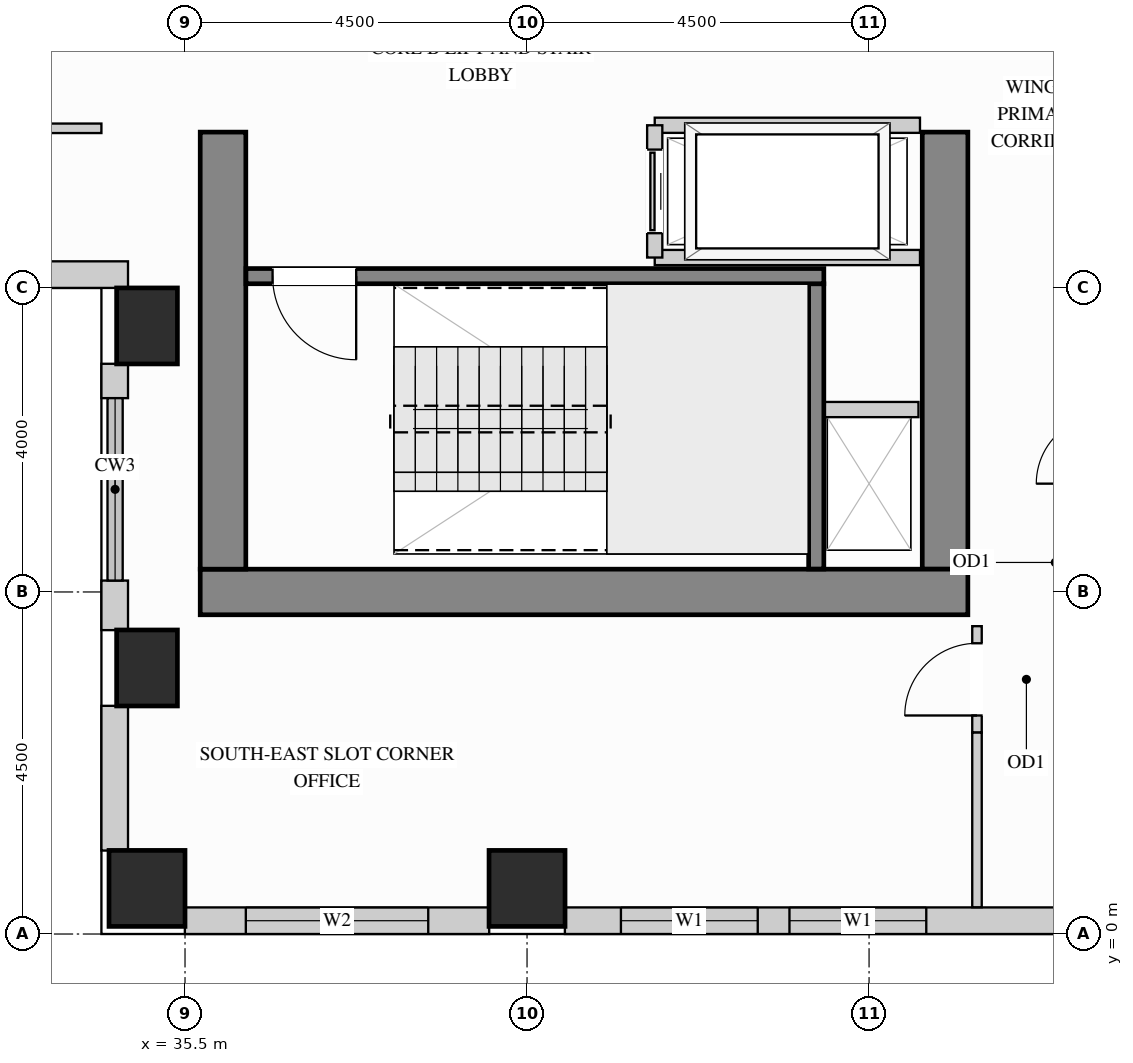
"""IFC4 building model, lengths in metres.
Left out: names, types, materials, properties, quantities, classifications, styles, units other than length and angle.
Written with IfcOpenShell. Run it as: python <this file> out.ifc"""

import sys

from ifc_helpers import new_model, si_unit, direction, frame, frame_2d, origin, origin_2d, place, context, subcontext, project, spatial, rectangle, extrude, source, transform, mapped, element, fill, save


model = new_model("IFC4")
c1 = context("Model", 3, precision=1e-05, world=origin(), true_north=direction((0.0, 1.0)))
c2 = subcontext(c1, "Body", "Model", "MODEL_VIEW")
j1 = project(units=[si_unit("LENGTHUNIT", "METRE"), si_unit("PLANEANGLEUNIT", "RADIAN")], contexts=[c1])
p1 = place(None, origin())
s1 = spatial("IfcSite", under=j1, at=p1, CompositionType="ELEMENT")
p2 = place(p1, origin())
s2 = spatial("IfcBuilding", under=s1, at=p2, CompositionType="ELEMENT")
p3 = place(p2, frame((0.0, 0.0, 161.1)))
s3 = spatial("IfcBuildingStorey", under=s2, at=p3, CompositionType="ELEMENT", Elevation=161.1)
m1 = source(origin(), c2, "Body", "SweptSolid", [
    extrude(rectangle(XDim=0.8, YDim=1.0, at=origin_2d()), origin(), (0.0, 0.0, 1.0), 3.4),
])
for number, where, z_axis, x_axis in (
    (1, (35.0, 3.5, 0.0), (0.0, 0.0, 1.0), (1.0, 0.0, 0.0)),
    (2, (35.0, 8.0, 0.0), (0.0, 0.0, 1.0), (1.0, 0.0, 0.0)),
):
    element("IfcColumn", number, at=place(p3, frame(where, z_axis=z_axis, x_axis=x_axis)), inside=s3, PredefinedType="COLUMN", context=c2, shape_type="MappedRepresentation", body=[
        mapped(m1, transform((0.0, 0.0, 0.0), x_axis=(1.0, 0.0, 0.0), y_axis=(0.0, 1.0, 0.0), z_axis=(0.0, 0.0, 1.0))),
    ])
m2 = source(origin(), c2, "Body", "SweptSolid", [
    extrude(rectangle(XDim=1.0, YDim=1.0, at=origin_2d()), origin(), (0.0, 0.0, 1.0), 3.4),
])
for number, where, z_axis, x_axis in (
    (3, (35.0, 0.6, 0.0), (0.0, 0.0, 1.0), (1.0, 0.0, 0.0)),
    (4, (40.0, 0.6, 0.0), (0.0, 0.0, 1.0), (1.0, 0.0, 0.0)),
):
    element("IfcColumn", number, at=place(p3, frame(where, z_axis=z_axis, x_axis=x_axis)), inside=s3, PredefinedType="COLUMN", context=c2, shape_type="MappedRepresentation", body=[
        mapped(m2, transform((0.0, 0.0, 0.0), x_axis=(1.0, 0.0, 0.0), y_axis=(0.0, 1.0, 0.0), z_axis=(0.0, 0.0, 1.0))),
    ])
m3 = source(origin(), c2, "Body", "SweptSolid", [
    extrude(rectangle(XDim=5.75, YDim=0.6, at=frame_2d((2.875, 0.0))), origin(), (0.0, 0.0, 1.0), 3.4),
])
p4 = place(p3, frame((45.5, 4.8, 0.0), z_axis=(0.0, 0.0, 1.0), x_axis=(0.0, 1.0, 0.0)))
e5 = element("IfcWall", 5, at=p4, inside=s3, PredefinedType="SHEAR", context=c2, shape_type="MappedRepresentation", body=[
    mapped(m3, transform((0.0, 0.0, 0.0), x_axis=(1.0, 0.0, 0.0), y_axis=(0.0, 1.0, 0.0), z_axis=(0.0, 0.0, 1.0))),
])
m4 = source(origin(), c2, "Body", "SweptSolid", [
    extrude(rectangle(XDim=10.1, YDim=0.6, at=frame_2d((5.05, 0.0))), origin(), (0.0, 0.0, 1.0), 3.4),
])
p5 = place(p3, frame((35.7, 4.5, 0.0), z_axis=(0.0, 0.0, 1.0), x_axis=(1.0, 0.0, 0.0)))
e6 = element("IfcWall", 6, at=p5, inside=s3, PredefinedType="SHEAR", context=c2, shape_type="MappedRepresentation", body=[
    mapped(m4, transform((0.0, 0.0, 0.0), x_axis=(1.0, 0.0, 0.0), y_axis=(0.0, 1.0, 0.0), z_axis=(0.0, 0.0, 1.0))),
])
p6 = place(p3, frame((36.0, 4.8, 0.0), z_axis=(0.0, 0.0, 1.0), x_axis=(0.0, 1.0, 0.0)))
e7 = element("IfcWall", 7, at=p6, inside=s3, PredefinedType="SHEAR", context=c2, shape_type="MappedRepresentation", body=[
    mapped(m3, transform((0.0, 0.0, 0.0), x_axis=(1.0, 0.0, 0.0), y_axis=(0.0, 1.0, 0.0), z_axis=(0.0, 0.0, 1.0))),
])
p7 = place(p3, frame((30.898, 8.675, 0.0), z_axis=(0.0, 0.0, 1.0), x_axis=(1.0, 0.0, 0.0)))
e8 = element("IfcWall", 8, at=p7, inside=s3, PredefinedType="SOLIDWALL", context=c2, shape_type="SweptSolid", body=[
    extrude(rectangle(XDim=3.852, YDim=0.35, at=frame_2d((1.926, 0.0))), origin(), (0.0, 0.0, 1.0), 3.385),
])
p8 = place(p7, frame((1.176, 0.0, 0.78)))
e9 = element("IfcOpeningElement", 9, at=p8, cuts=e8, PredefinedType="OPENING", context=c2, shape_type="SweptSolid", body=[
    extrude(rectangle(XDim=1.5, YDim=2.0, at=frame_2d((0.75, 1.0))), frame((0.0, 0.185, 0.0), z_axis=(0.0, -1.0, 0.0), x_axis=(1.0, 0.0, 0.0)), (0.0, 0.0, 1.0), 0.37),
])
m5 = source(origin(), c2, "Body", "SweptSolid", [
    extrude(rectangle(XDim=0.452, YDim=0.35, at=frame_2d((0.226, 0.0))), origin(), (0.0, 0.0, 1.0), 2.612),
])
p9 = place(p3, frame((34.575, 7.502, 0.0), z_axis=(0.0, 0.0, 1.0), x_axis=(0.0, -1.0, 0.0)))
e10 = element("IfcWall", 10, at=p9, inside=s3, PredefinedType="SOLIDWALL", context=c2, shape_type="MappedRepresentation", body=[
    mapped(m5, transform((0.0, 0.0, 0.0), x_axis=(1.0, 0.0, 0.0), y_axis=(0.0, 1.0, 0.0), z_axis=(0.0, 0.0, 1.0))),
])
m6 = source(origin(), c2, "Body", "SweptSolid", [
    extrude(rectangle(XDim=0.652, YDim=0.35, at=frame_2d((0.326, 0.0))), origin(), (0.0, 0.0, 1.0), 2.612),
])
p10 = place(p3, frame((34.575, 4.65, 0.0), z_axis=(0.0, 0.0, 1.0), x_axis=(0.0, -1.0, 0.0)))
e11 = element("IfcWall", 11, at=p10, inside=s3, PredefinedType="SOLIDWALL", context=c2, shape_type="MappedRepresentation", body=[
    mapped(m6, transform((0.0, 0.0, 0.0), x_axis=(1.0, 0.0, 0.0), y_axis=(0.0, 1.0, 0.0), z_axis=(0.0, 0.0, 1.0))),
])
m7 = source(origin(), c2, "Body", "SweptSolid", [
    extrude(rectangle(XDim=1.904, YDim=0.35, at=frame_2d((0.952, 0.0))), origin(), (0.0, 0.0, 1.0), 2.612),
])
p11 = place(p3, frame((34.575, 3.002, 0.0), z_axis=(0.0, 0.0, 1.0), x_axis=(0.0, -1.0, 0.0)))
e12 = element("IfcWall", 12, at=p11, inside=s3, PredefinedType="SOLIDWALL", context=c2, shape_type="MappedRepresentation", body=[
    mapped(m7, transform((0.0, 0.0, 0.0), x_axis=(1.0, 0.0, 0.0), y_axis=(0.0, 1.0, 0.0), z_axis=(0.0, 0.0, 1.0))),
])
p12 = place(p3, frame((35.498, 0.175, 0.0), z_axis=(0.0, 0.0, 1.0), x_axis=(1.0, 0.0, 0.0)))
e13 = element("IfcWall", 13, at=p12, inside=s3, PredefinedType="SOLIDWALL", context=c2, shape_type="SweptSolid", body=[
    extrude(rectangle(XDim=4.004, YDim=0.35, at=frame_2d((2.002, 0.0))), origin(), (0.0, 0.0, 1.0), 2.448),
])
p13 = place(p12, frame((0.802, 0.0, 0.78)))
e14 = element("IfcOpeningElement", 14, at=p13, cuts=e13, PredefinedType="OPENING", context=c2, shape_type="SweptSolid", body=[
    extrude(rectangle(XDim=2.4, YDim=1.488, at=frame_2d((1.2, 0.744))), frame((0.0, 0.185, 0.0), z_axis=(0.0, -1.0, 0.0), x_axis=(1.0, 0.0, 0.0)), (0.0, 0.0, 1.0), 0.37),
])
p14 = place(p3, frame((40.498, 0.175, 0.0), z_axis=(0.0, 0.0, 1.0), x_axis=(1.0, 0.0, 0.0)))
e15 = element("IfcWall", 15, at=p14, inside=s3, PredefinedType="SOLIDWALL", context=c2, shape_type="SweptSolid", body=[
    extrude(rectangle(XDim=6.604, YDim=0.35, at=frame_2d((3.302, 0.0))), origin(), (0.0, 0.0, 1.0), 2.448),
])
p15 = place(p14, frame((0.737, 0.0, 0.78)))
e16 = element("IfcOpeningElement", 16, at=p15, cuts=e15, PredefinedType="OPENING", context=c2, shape_type="SweptSolid", body=[
    extrude(rectangle(XDim=1.8, YDim=1.488, at=frame_2d((0.9, 0.744))), frame((0.0, 0.185, 0.0), z_axis=(0.0, -1.0, 0.0), x_axis=(1.0, 0.0, 0.0)), (0.0, 0.0, 1.0), 0.37),
])
p16 = place(p14, frame((2.955, 0.0, 0.78)))
e17 = element("IfcOpeningElement", 17, at=p16, cuts=e15, PredefinedType="OPENING", context=c2, shape_type="SweptSolid", body=[
    extrude(rectangle(XDim=1.8, YDim=1.488, at=frame_2d((0.9, 0.744))), frame((0.0, 0.185, 0.0), z_axis=(0.0, -1.0, 0.0), x_axis=(1.0, 0.0, 0.0)), (0.0, 0.0, 1.0), 0.37),
])
p17 = place(p3, frame((45.92, 2.65, 0.0), z_axis=(0.0, 0.0, 1.0), x_axis=(0.0, 1.0, 0.0)))
e18 = element("IfcWall", 18, at=p17, inside=s3, PredefinedType="PARTITIONING", context=c2, shape_type="SweptSolid", body=[
    extrude(rectangle(XDim=1.4, YDim=0.125, at=frame_2d((0.7, 0.0))), origin(), (0.0, 0.0, 1.0), 3.385),
])
p18 = place(p17, frame((0.225, 0.0, 0.0)))
e19 = element("IfcOpeningElement", 19, at=p18, cuts=e18, PredefinedType="OPENING", context=c2, shape_type="SweptSolid", body=[
    extrude(rectangle(XDim=0.95, YDim=2.15, at=frame_2d((0.475, 1.075))), frame((0.0, 0.073, 0.0), z_axis=(0.0, -1.0, 0.0), x_axis=(1.0, 0.0, 0.0)), (0.0, 0.0, 1.0), 0.145),
])
m8 = source(origin(), c2, "Body", "SweptSolid", [
    extrude(rectangle(XDim=2.298, YDim=0.125, at=frame_2d((1.149, 0.0))), origin(), (0.0, 0.0, 1.0), 3.385),
])
p19 = place(p3, frame((45.92, 0.352, 0.0), z_axis=(0.0, 0.0, 1.0), x_axis=(0.0, 1.0, 0.0)))
e20 = element("IfcWall", 20, at=p19, inside=s3, PredefinedType="PARTITIONING", context=c2, shape_type="MappedRepresentation", body=[
    mapped(m8, transform((0.0, 0.0, 0.0), x_axis=(1.0, 0.0, 0.0), y_axis=(0.0, 1.0, 0.0), z_axis=(0.0, 0.0, 1.0))),
])
p20 = place(p3, frame((29.85, 10.6, 0.0), z_axis=(0.0, 0.0, 1.0), x_axis=(1.0, 0.0, 0.0)))
e21 = element("IfcWall", 21, at=p20, inside=s3, PredefinedType="PARTITIONING", context=c2, shape_type="SweptSolid", body=[
    extrude(rectangle(XDim=4.55, YDim=0.125, at=frame_2d((2.275, 0.0))), origin(), (0.0, 0.0, 1.0), 3.385),
])
p21 = place(p20, frame((1.8, 0.0, 0.0)))
e22 = element("IfcOpeningElement", 22, at=p21, cuts=e21, PredefinedType="OPENING", context=c2, shape_type="SweptSolid", body=[
    extrude(rectangle(XDim=0.95, YDim=2.15, at=frame_2d((0.475, 1.075))), frame((0.0, 0.073, 0.0), z_axis=(0.0, -1.0, 0.0), x_axis=(1.0, 0.0, 0.0)), (0.0, 0.0, 1.0), 0.145),
])
m9 = source(origin(), c2, "Body", "SweptSolid", [
    extrude(rectangle(XDim=1.3, YDim=0.2, at=frame_2d((0.65, 0.0))), origin(), (0.0, 0.0, 1.0), 3.385),
])
p22 = place(p3, frame((43.85, 6.9, 0.0), z_axis=(0.0, 0.0, 1.0), x_axis=(1.0, 0.0, 0.0)))
e23 = element("IfcWall", 23, at=p22, inside=s3, PredefinedType="PARTITIONING", context=c2, shape_type="MappedRepresentation", body=[
    mapped(m9, transform((0.0, 0.0, 0.0), x_axis=(1.0, 0.0, 0.0), y_axis=(0.0, 1.0, 0.0), z_axis=(0.0, 0.0, 1.0))),
])
m10 = source(origin(), c2, "Body", "SweptSolid", [
    extrude(rectangle(XDim=3.49, YDim=0.2, at=frame_2d((1.745, 0.0))), origin(), (0.0, 0.0, 1.0), 3.385),
])
for number, where, z_axis, x_axis in (
    (24, (41.68, 10.64, 0.0), (0.0, 0.0, 1.0), (1.0, 0.0, 0.0)),
    (25, (41.68, 8.9, 0.0), (0.0, 0.0, 1.0), (1.0, 0.0, 0.0)),
):
    element("IfcWall", number, at=place(p3, frame(where, z_axis=z_axis, x_axis=x_axis)), inside=s3, PredefinedType="PARTITIONING", context=c2, shape_type="MappedRepresentation", body=[
        mapped(m10, transform((0.0, 0.0, 0.0), x_axis=(1.0, 0.0, 0.0), y_axis=(0.0, 1.0, 0.0), z_axis=(0.0, 0.0, 1.0))),
    ])
p23 = place(p3, frame((41.68, 8.9, 0.0), z_axis=(0.0, 0.0, 1.0), x_axis=(0.0, 1.0, 0.0)))
e26 = element("IfcWall", 26, at=p23, inside=s3, PredefinedType="PARTITIONING", context=c2, shape_type="SweptSolid", body=[
    extrude(rectangle(XDim=1.74, YDim=0.2, at=frame_2d((0.87, 0.0))), origin(), (0.0, 0.0, 1.0), 3.385),
])
p24 = place(p23, frame((0.32, 0.0, 0.0)))
e27 = element("IfcOpeningElement", 27, at=p24, cuts=e26, PredefinedType="OPENING", context=c2, shape_type="SweptSolid", body=[
    extrude(rectangle(XDim=1.1, YDim=2.2, at=frame_2d((0.55, 1.1))), frame((0.0, 0.11, 0.0), z_axis=(0.0, -1.0, 0.0), x_axis=(1.0, 0.0, 0.0)), (0.0, 0.0, 1.0), 0.22),
])
m11 = source(origin(), c2, "Body", "SweptSolid", [
    extrude(rectangle(XDim=3.753, YDim=0.2, at=frame_2d((1.876, 0.0))), origin(), (0.0, 0.0, 1.0), 3.4),
])
p25 = place(p3, frame((43.805, 4.802, 0.0), z_axis=(0.0, 0.0, 1.0), x_axis=(0.0, 1.0, 0.0)))
e28 = element("IfcWall", 28, at=p25, inside=s3, PredefinedType="SHEAR", context=c2, shape_type="MappedRepresentation", body=[
    mapped(m11, transform((0.0, 0.0, 0.0), x_axis=(1.0, 0.0, 0.0), y_axis=(0.0, 1.0, 0.0), z_axis=(0.0, 0.0, 1.0))),
])
p26 = place(p3, frame((36.302, 8.655, 0.0), z_axis=(0.0, 0.0, 1.0), x_axis=(1.0, 0.0, 0.0)))
e29 = element("IfcWall", 29, at=p26, inside=s3, PredefinedType="SHEAR", context=c2, shape_type="SweptSolid", body=[
    extrude(rectangle(XDim=7.603, YDim=0.2, at=frame_2d((3.802, 0.0))), origin(), (0.0, 0.0, 1.0), 3.4),
])
p27 = place(p26, frame((0.35, 0.0, 0.0)))
e30 = element("IfcOpeningElement", 30, at=p27, cuts=e29, PredefinedType="OPENING", context=c2, shape_type="SweptSolid", body=[
    extrude(rectangle(XDim=1.1, YDim=2.15, at=frame_2d((0.55, 1.075))), frame((0.0, 0.11, 0.0), z_axis=(0.0, -1.0, 0.0), x_axis=(1.0, 0.0, 0.0)), (0.0, 0.0, 1.0), 0.22),
])
m12 = source(origin(), c2, "Body", "SweptSolid", [
    extrude(rectangle(XDim=1.1, YDim=2.2, at=frame_2d((0.55, 1.1))), frame((0.0, 0.025, 0.0), z_axis=(0.0, -1.0, 0.0), x_axis=(1.0, 0.0, 0.0)), (0.0, 0.0, 1.0), 0.05),
])
p28 = place(p24, origin())
e31 = element("IfcDoor", 31, at=p28, inside=s3, OperationType="SLIDING_TO_LEFT", PredefinedType="DOOR", context=c2, shape_type="MappedRepresentation", body=[
    mapped(m12, transform((0.0, 0.0, 0.0), x_axis=(1.0, 0.0, 0.0), y_axis=(0.0, 1.0, 0.0), z_axis=(0.0, 0.0, 1.0))),
])
fill(e27, e31)
m13 = source(origin(), c2, "Body", "SweptSolid", [
    extrude(rectangle(XDim=0.95, YDim=2.15, at=frame_2d((0.475, 1.075))), frame((0.0, 0.025, 0.0), z_axis=(0.0, -1.0, 0.0), x_axis=(1.0, 0.0, 0.0)), (0.0, 0.0, 1.0), 0.05),
])
p29 = place(p18, origin())
e32 = element("IfcDoor", 32, at=p29, inside=s3, OperationType="SINGLE_SWING_LEFT", PredefinedType="DOOR", context=c2, shape_type="MappedRepresentation", body=[
    mapped(m13, transform((0.0, 0.0, 0.0), x_axis=(1.0, 0.0, 0.0), y_axis=(0.0, 1.0, 0.0), z_axis=(0.0, 0.0, 1.0))),
])
fill(e19, e32)
m14 = source(origin(), c2, "Body", "SweptSolid", [
    extrude(rectangle(XDim=1.1, YDim=2.15, at=frame_2d((0.55, 1.075))), frame((0.0, 0.025, 0.0), z_axis=(0.0, -1.0, 0.0), x_axis=(1.0, 0.0, 0.0)), (0.0, 0.0, 1.0), 0.05),
])
p30 = place(p27, origin())
e33 = element("IfcDoor", 33, at=p30, inside=s3, OperationType="SINGLE_SWING_RIGHT", PredefinedType="DOOR", context=c2, shape_type="MappedRepresentation", body=[
    mapped(m14, transform((0.0, 0.0, 0.0), x_axis=(1.0, 0.0, 0.0), y_axis=(0.0, 1.0, 0.0), z_axis=(0.0, 0.0, 1.0))),
])
fill(e30, e33)
m15 = source(origin(), c2, "Body", "SweptSolid", [
    extrude(rectangle(XDim=1.8, YDim=1.488, at=frame_2d((0.9, 0.744))), frame((0.0, 0.03, 0.0), z_axis=(0.0, -1.0, 0.0), x_axis=(1.0, 0.0, 0.0)), (0.0, 0.0, 1.0), 0.06),
])
p31 = place(p15, origin())
e34 = element("IfcWindow", 34, at=p31, inside=s3, PartitioningType="SINGLE_PANEL", PredefinedType="WINDOW", context=c2, shape_type="MappedRepresentation", body=[
    mapped(m15, transform((0.0, 0.0, 0.0), x_axis=(1.0, 0.0, 0.0), y_axis=(0.0, 1.0, 0.0), z_axis=(0.0, 0.0, 1.0))),
])
fill(e16, e34)
p32 = place(p16, origin())
e35 = element("IfcWindow", 35, at=p32, inside=s3, PartitioningType="SINGLE_PANEL", PredefinedType="WINDOW", context=c2, shape_type="MappedRepresentation", body=[
    mapped(m15, transform((0.0, 0.0, 0.0), x_axis=(1.0, 0.0, 0.0), y_axis=(0.0, 1.0, 0.0), z_axis=(0.0, 0.0, 1.0))),
])
fill(e17, e35)
m16 = source(origin(), c2, "Body", "SweptSolid", [
    extrude(rectangle(XDim=2.4, YDim=1.488, at=frame_2d((1.2, 0.744))), frame((0.0, 0.03, 0.0), z_axis=(0.0, -1.0, 0.0), x_axis=(1.0, 0.0, 0.0)), (0.0, 0.0, 1.0), 0.06),
])
p33 = place(p13, origin())
e36 = element("IfcWindow", 36, at=p33, inside=s3, PartitioningType="SINGLE_PANEL", PredefinedType="WINDOW", context=c2, shape_type="MappedRepresentation", body=[
    mapped(m16, transform((0.0, 0.0, 0.0), x_axis=(1.0, 0.0, 0.0), y_axis=(0.0, 1.0, 0.0), z_axis=(0.0, 0.0, 1.0))),
])
fill(e14, e36)
save(model, sys.argv[1])
